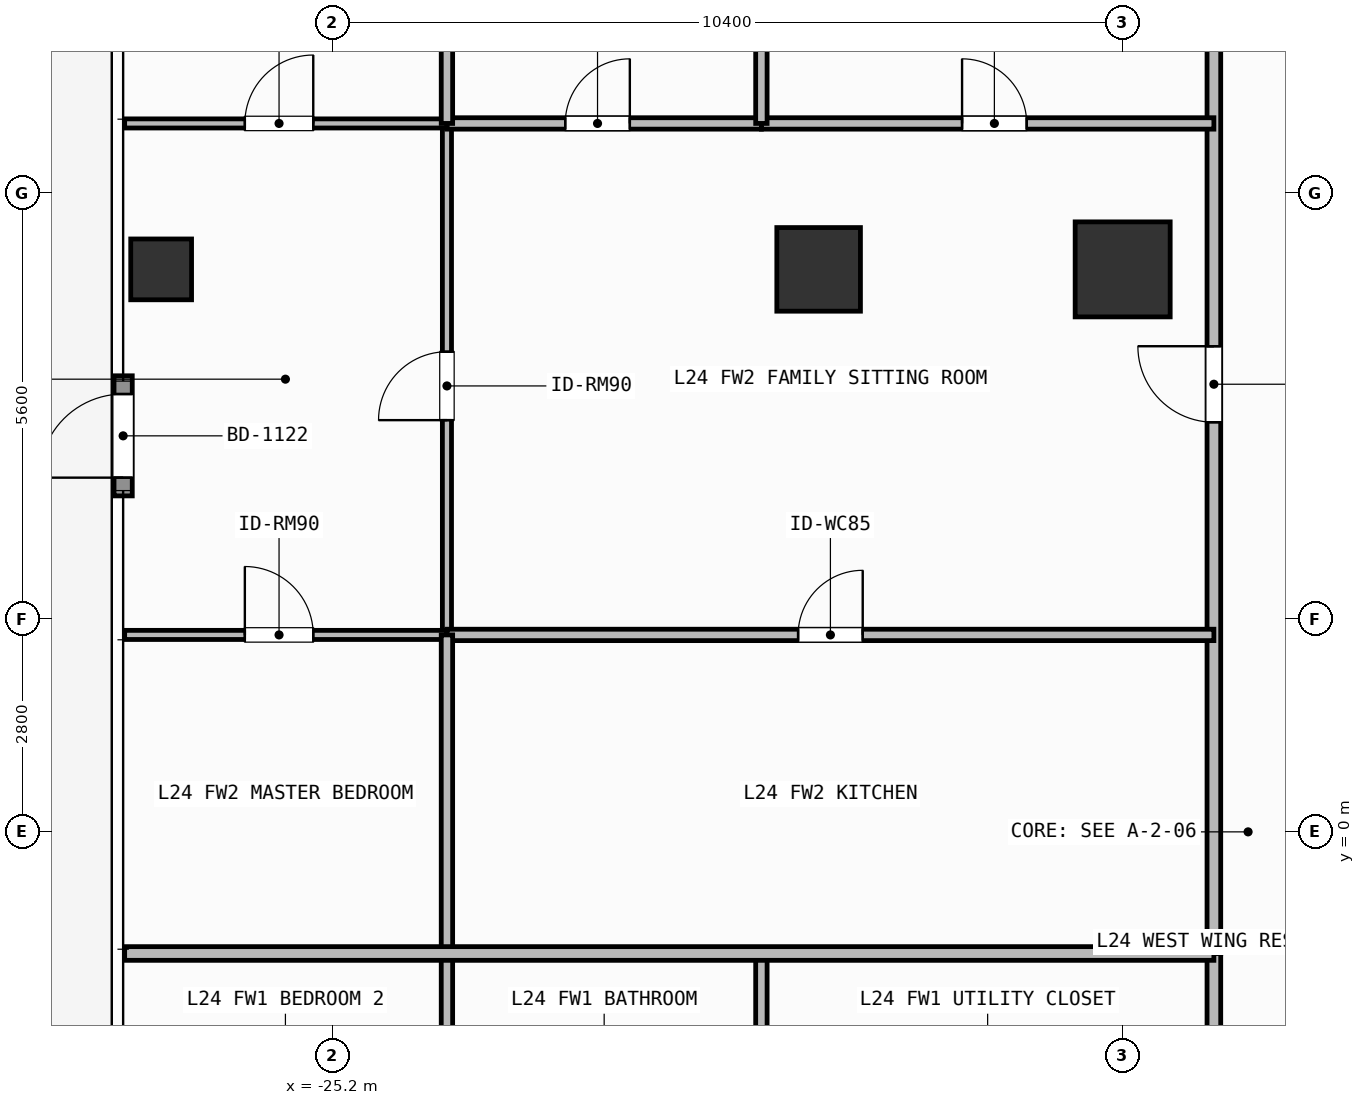
"""IFC4 building model, lengths in metres.
Left out: names, types, materials, properties, quantities, classifications, styles, units other than length and angle.
Written with IfcOpenShell. Run it as: python <this file> out.ifc"""

import sys

from ifc_helpers import new_model, si_unit, direction, frame, frame_2d, origin, origin_2d, place, context, subcontext, project, spatial, rectangle, hollow_rectangle, extrude, element, fill, save


model = new_model("IFC4")
c1 = context("Model", 3, precision=1e-05, world=origin(), true_north=direction((0.0, 1.0)))
c2 = subcontext(c1, "Body", "Model", "MODEL_VIEW")
j1 = project(units=[si_unit("LENGTHUNIT", "METRE"), si_unit("PLANEANGLEUNIT", "RADIAN")], contexts=[c1])
p1 = place(None, origin())
s1 = spatial("IfcSite", under=j1, at=p1, CompositionType="ELEMENT")
p2 = place(p1, origin())
s2 = spatial("IfcBuilding", under=s1, at=p2, CompositionType="ELEMENT")
p3 = place(p2, frame((0.0, 0.0, 96.9)))
s3 = spatial("IfcBuildingStorey", under=s2, at=p3, CompositionType="ELEMENT", Elevation=96.9)
p4 = place(p3, frame((-14.8, 7.4, 0.0), z_axis=(0.0, 0.0, 1.0), x_axis=(1.0, 0.0, 0.0)))
e1 = element("IfcColumn", 1, at=p4, inside=s3, PredefinedType="COLUMN", context=c2, shape_type="SweptSolid", body=[
    extrude(rectangle(XDim=1.25, YDim=1.25, at=origin_2d()), origin(), (0.0, 0.0, 1.0), 3.9),
])
p5 = place(p3, frame((-18.8, 7.4, 0.0), z_axis=(0.0, 0.0, 1.0), x_axis=(1.0, 0.0, 0.0)))
e2 = element("IfcColumn", 2, at=p5, inside=s3, PredefinedType="COLUMN", context=c2, shape_type="SweptSolid", body=[
    extrude(rectangle(XDim=1.1, YDim=1.1, at=origin_2d()), origin(), (0.0, 0.0, 1.0), 3.9),
])
p6 = place(p3, frame((-27.45, 7.4, 0.0), z_axis=(0.0, 0.0, 1.0), x_axis=(1.0, 0.0, 0.0)))
e3 = element("IfcColumn", 3, at=p6, inside=s3, PredefinedType="COLUMN", context=c2, shape_type="SweptSolid", body=[
    extrude(hollow_rectangle(XDim=0.8, YDim=0.8, WallThickness=0.036, at=origin_2d()), origin(), (0.0, 0.0, 1.0), 3.9),
])
p7 = place(p3, frame((-27.95, 4.42, 0.0), z_axis=(0.0, 0.0, 1.0), x_axis=(0.0, 1.0, 0.0)))
e4 = element("IfcWall", 4, at=p7, inside=s3, PredefinedType="SOLIDWALL", context=c2, shape_type="SweptSolid", body=[
    extrude(rectangle(XDim=1.58, YDim=0.24, at=frame_2d((0.79, 0.0))), origin(), (0.0, 0.0, 1.0), 3.68),
])
p8 = place(p7, frame((0.24, 0.0, 0.0)))
e5 = element("IfcOpeningElement", 5, at=p8, cuts=e4, PredefinedType="OPENING", context=c2, shape_type="SweptSolid", body=[
    extrude(rectangle(XDim=1.1, YDim=2.2, at=frame_2d((0.55, 1.1))), frame((0.0, 0.13, 0.0), z_axis=(0.0, -1.0, 0.0), x_axis=(1.0, 0.0, 0.0)), (0.0, 0.0, 1.0), 0.26),
])
p9 = place(p3, frame((-13.6, -12.12, 0.0), z_axis=(0.0, 0.0, 1.0), x_axis=(0.0, 1.0, 0.0)))
e6 = element("IfcWall", 6, at=p9, inside=s3, PredefinedType="PARTITIONING", context=c2, shape_type="SweptSolid", body=[
    extrude(rectangle(XDim=10.52, YDim=0.18, at=frame_2d((5.26, 0.0))), origin(), (0.0, 0.0, 1.0), 3.68),
])
p10 = place(p9, frame((5.468, 0.0, 0.0)))
e7 = element("IfcOpeningElement", 7, at=p10, cuts=e6, PredefinedType="OPENING", context=c2, shape_type="SweptSolid", body=[
    extrude(rectangle(XDim=1.0, YDim=2.2, at=frame_2d((0.5, 1.1))), frame((0.0, 0.1, 0.0), z_axis=(0.0, -1.0, 0.0), x_axis=(1.0, 0.0, 0.0)), (0.0, 0.0, 1.0), 0.2),
])
p11 = place(p3, frame((-13.6, -1.6, 0.0), z_axis=(0.0, 0.0, 1.0), x_axis=(0.0, 1.0, 0.0)))
e8 = element("IfcWall", 8, at=p11, inside=s3, PredefinedType="PARTITIONING", context=c2, shape_type="SweptSolid", body=[
    extrude(rectangle(XDim=13.72, YDim=0.18, at=frame_2d((6.86, 0.0))), origin(), (0.0, 0.0, 1.0), 3.68),
])
p12 = place(p11, frame((6.989, 0.0, 0.0)))
e9 = element("IfcOpeningElement", 9, at=p12, cuts=e8, PredefinedType="OPENING", context=c2, shape_type="SweptSolid", body=[
    extrude(rectangle(XDim=1.0, YDim=2.2, at=frame_2d((0.5, 1.1))), frame((0.0, 0.1, 0.0), z_axis=(0.0, -1.0, 0.0), x_axis=(1.0, 0.0, 0.0)), (0.0, 0.0, 1.0), 0.2),
])
p13 = place(p3, frame((-23.69, 2.591, 0.0), z_axis=(0.0, 0.0, 1.0), x_axis=(0.0, 1.0, 0.0)))
e10 = element("IfcWall", 10, at=p13, inside=s3, PredefinedType="PARTITIONING", context=c2, shape_type="SweptSolid", body=[
    extrude(rectangle(XDim=6.729, YDim=0.12, at=frame_2d((3.365, 0.0))), origin(), (0.0, 0.0, 1.0), 3.68),
])
p14 = place(p13, frame((2.826, 0.0, 0.0)))
e11 = element("IfcOpeningElement", 11, at=p14, cuts=e10, PredefinedType="OPENING", context=c2, shape_type="SweptSolid", body=[
    extrude(rectangle(XDim=0.9, YDim=2.1, at=frame_2d((0.45, 1.05))), frame((0.0, 0.07, 0.0), z_axis=(0.0, -1.0, 0.0), x_axis=(1.0, 0.0, 0.0)), (0.0, 0.0, 1.0), 0.14),
])
p15 = place(p3, frame((-23.69, 9.32, 0.0), z_axis=(0.0, 0.0, 1.0), x_axis=(1.0, 0.0, 0.0)))
e12 = element("IfcWall", 12, at=p15, inside=s3, PredefinedType="PARTITIONING", context=c2, shape_type="SweptSolid", body=[
    extrude(rectangle(XDim=4.137, YDim=0.15, at=frame_2d((2.068, 0.0))), origin(), (0.0, 0.0, 1.0), 3.68),
])
p16 = place(p15, frame((1.556, 0.0, 0.0)))
e13 = element("IfcOpeningElement", 13, at=p16, cuts=e12, PredefinedType="OPENING", context=c2, shape_type="SweptSolid", body=[
    extrude(rectangle(XDim=0.85, YDim=2.1, at=frame_2d((0.425, 1.05))), frame((0.0, 0.085, 0.0), z_axis=(0.0, -1.0, 0.0), x_axis=(1.0, 0.0, 0.0)), (0.0, 0.0, 1.0), 0.17),
])
p17 = place(p3, frame((-19.553, 9.32, 0.0), z_axis=(0.0, 0.0, 1.0), x_axis=(1.0, 0.0, 0.0)))
e14 = element("IfcWall", 14, at=p17, inside=s3, PredefinedType="PARTITIONING", context=c2, shape_type="SweptSolid", body=[
    extrude(rectangle(XDim=5.953, YDim=0.15, at=frame_2d((2.977, 0.0))), origin(), (0.0, 0.0, 1.0), 3.68),
])
p18 = place(p17, frame((2.64, 0.0, 0.0)))
e15 = element("IfcOpeningElement", 15, at=p18, cuts=e14, PredefinedType="OPENING", context=c2, shape_type="SweptSolid", body=[
    extrude(rectangle(XDim=0.85, YDim=2.1, at=frame_2d((0.425, 1.05))), frame((0.0, 0.085, 0.0), z_axis=(0.0, -1.0, 0.0), x_axis=(1.0, 0.0, 0.0)), (0.0, 0.0, 1.0), 0.17),
])
p19 = place(p3, frame((-23.69, 2.591, 0.0), z_axis=(0.0, 0.0, 1.0), x_axis=(1.0, 0.0, 0.0)))
e16 = element("IfcWall", 16, at=p19, inside=s3, PredefinedType="PARTITIONING", context=c2, shape_type="SweptSolid", body=[
    extrude(rectangle(XDim=10.09, YDim=0.15, at=frame_2d((5.045, 0.0))), origin(), (0.0, 0.0, 1.0), 3.68),
])
p20 = place(p19, frame((4.62, 0.0, 0.0)))
e17 = element("IfcOpeningElement", 17, at=p20, cuts=e16, PredefinedType="OPENING", context=c2, shape_type="SweptSolid", body=[
    extrude(rectangle(XDim=0.85, YDim=2.1, at=frame_2d((0.425, 1.05))), frame((0.0, 0.085, 0.0), z_axis=(0.0, -1.0, 0.0), x_axis=(1.0, 0.0, 0.0)), (0.0, 0.0, 1.0), 0.17),
])
p21 = place(p3, frame((-27.93, 2.591, 0.0), z_axis=(0.0, 0.0, 1.0), x_axis=(1.0, 0.0, 0.0)))
e18 = element("IfcWall", 18, at=p21, inside=s3, PredefinedType="PARTITIONING", context=c2, shape_type="SweptSolid", body=[
    extrude(rectangle(XDim=4.24, YDim=0.12, at=frame_2d((2.12, 0.0))), origin(), (0.0, 0.0, 1.0), 3.68),
])
p22 = place(p21, frame((1.581, 0.0, 0.0)))
e19 = element("IfcOpeningElement", 19, at=p22, cuts=e18, PredefinedType="OPENING", context=c2, shape_type="SweptSolid", body=[
    extrude(rectangle(XDim=0.9, YDim=2.1, at=frame_2d((0.45, 1.05))), frame((0.0, 0.07, 0.0), z_axis=(0.0, -1.0, 0.0), x_axis=(1.0, 0.0, 0.0)), (0.0, 0.0, 1.0), 0.14),
])
p23 = place(p3, frame((-27.93, 9.32, 0.0), z_axis=(0.0, 0.0, 1.0), x_axis=(1.0, 0.0, 0.0)))
e20 = element("IfcWall", 20, at=p23, inside=s3, PredefinedType="PARTITIONING", context=c2, shape_type="SweptSolid", body=[
    extrude(rectangle(XDim=4.24, YDim=0.12, at=frame_2d((2.12, 0.0))), origin(), (0.0, 0.0, 1.0), 3.68),
])
p24 = place(p23, frame((1.581, 0.0, 0.0)))
e21 = element("IfcOpeningElement", 21, at=p24, cuts=e20, PredefinedType="OPENING", context=c2, shape_type="SweptSolid", body=[
    extrude(rectangle(XDim=0.9, YDim=2.1, at=frame_2d((0.45, 1.05))), frame((0.0, 0.07, 0.0), z_axis=(0.0, -1.0, 0.0), x_axis=(1.0, 0.0, 0.0)), (0.0, 0.0, 1.0), 0.14),
])
for number, where, z_axis, x_axis in (
    (22, (-19.553, -5.224, 0.0), (0.0, 0.0, 1.0), (0.0, 1.0, 0.0)),
    (23, (-23.69, -5.224, 0.0), (0.0, 0.0, 1.0), (0.0, 1.0, 0.0)),
):
    element("IfcWall", number, at=place(p3, frame(where, z_axis=z_axis, x_axis=x_axis)), inside=s3, PredefinedType="PARTITIONING", context=c2, shape_type="SweptSolid", body=[
        extrude(rectangle(XDim=3.624, YDim=0.15, at=frame_2d((1.812, 0.0))), origin(), (0.0, 0.0, 1.0), 3.68),
    ])
p25 = place(p3, frame((-19.553, 9.32, 0.0), z_axis=(0.0, 0.0, 1.0), x_axis=(0.0, 1.0, 0.0)))
e24 = element("IfcWall", 24, at=p25, inside=s3, PredefinedType="PARTITIONING", context=c2, shape_type="SweptSolid", body=[
    extrude(rectangle(XDim=2.8, YDim=0.15, at=frame_2d((1.4, 0.0))), origin(), (0.0, 0.0, 1.0), 3.68),
])
p26 = place(p3, frame((-23.69, -1.6, 0.0), z_axis=(0.0, 0.0, 1.0), x_axis=(0.0, 1.0, 0.0)))
e25 = element("IfcWall", 25, at=p26, inside=s3, PredefinedType="PARTITIONING", context=c2, shape_type="SweptSolid", body=[
    extrude(rectangle(XDim=4.191, YDim=0.15, at=frame_2d((2.096, 0.0))), origin(), (0.0, 0.0, 1.0), 3.68),
])
p27 = place(p3, frame((-23.69, 9.32, 0.0), z_axis=(0.0, 0.0, 1.0), x_axis=(0.0, 1.0, 0.0)))
e26 = element("IfcWall", 26, at=p27, inside=s3, PredefinedType="PARTITIONING", context=c2, shape_type="SweptSolid", body=[
    extrude(rectangle(XDim=2.8, YDim=0.15, at=frame_2d((1.4, 0.0))), origin(), (0.0, 0.0, 1.0), 3.68),
])
p28 = place(p3, frame((-27.93, -1.6, 0.0), z_axis=(0.0, 0.0, 1.0), x_axis=(1.0, 0.0, 0.0)))
e27 = element("IfcWall", 27, at=p28, inside=s3, PredefinedType="PARTITIONING", context=c2, shape_type="SweptSolid", body=[
    extrude(rectangle(XDim=14.33, YDim=0.18, at=frame_2d((7.165, 0.0))), origin(), (0.0, 0.0, 1.0), 3.68),
])
p29 = place(p8, origin())
e28 = element("IfcDoor", 28, at=p29, inside=s3, OperationType="SINGLE_SWING_LEFT", PredefinedType="DOOR", context=c2, shape_type="SweptSolid", body=[
    extrude(rectangle(XDim=1.1, YDim=2.2, at=frame_2d((0.55, 1.1))), frame((0.0, 0.025, 0.0), z_axis=(0.0, -1.0, 0.0), x_axis=(1.0, 0.0, 0.0)), (0.0, 0.0, 1.0), 0.05),
])
fill(e5, e28)
p30 = place(p12, origin())
e29 = element("IfcDoor", 29, at=p30, inside=s3, OperationType="SINGLE_SWING_RIGHT", PredefinedType="DOOR", context=c2, shape_type="SweptSolid", body=[
    extrude(rectangle(XDim=1.0, YDim=2.2, at=frame_2d((0.5, 1.1))), frame((0.0, 0.025, 0.0), z_axis=(0.0, -1.0, 0.0), x_axis=(1.0, 0.0, 0.0)), (0.0, 0.0, 1.0), 0.05),
])
fill(e9, e29)
p31 = place(p14, origin())
e30 = element("IfcDoor", 30, at=p31, inside=s3, OperationType="SINGLE_SWING_LEFT", PredefinedType="DOOR", context=c2, shape_type="SweptSolid", body=[
    extrude(rectangle(XDim=0.9, YDim=2.1, at=frame_2d((0.45, 1.05))), frame((0.0, 0.025, 0.0), z_axis=(0.0, -1.0, 0.0), x_axis=(1.0, 0.0, 0.0)), (0.0, 0.0, 1.0), 0.05),
])
fill(e11, e30)
p32 = place(p16, origin())
e31 = element("IfcDoor", 31, at=p32, inside=s3, OperationType="SINGLE_SWING_RIGHT", PredefinedType="DOOR", context=c2, shape_type="SweptSolid", body=[
    extrude(rectangle(XDim=0.85, YDim=2.1, at=frame_2d((0.425, 1.05))), frame((0.0, 0.025, 0.0), z_axis=(0.0, -1.0, 0.0), x_axis=(1.0, 0.0, 0.0)), (0.0, 0.0, 1.0), 0.05),
])
fill(e13, e31)
p33 = place(p18, origin())
e32 = element("IfcDoor", 32, at=p33, inside=s3, OperationType="SINGLE_SWING_LEFT", PredefinedType="DOOR", context=c2, shape_type="SweptSolid", body=[
    extrude(rectangle(XDim=0.85, YDim=2.1, at=frame_2d((0.425, 1.05))), frame((0.0, 0.025, 0.0), z_axis=(0.0, -1.0, 0.0), x_axis=(1.0, 0.0, 0.0)), (0.0, 0.0, 1.0), 0.05),
])
fill(e15, e32)
p34 = place(p20, origin())
e33 = element("IfcDoor", 33, at=p34, inside=s3, OperationType="SINGLE_SWING_RIGHT", PredefinedType="DOOR", context=c2, shape_type="SweptSolid", body=[
    extrude(rectangle(XDim=0.85, YDim=2.1, at=frame_2d((0.425, 1.05))), frame((0.0, 0.025, 0.0), z_axis=(0.0, -1.0, 0.0), x_axis=(1.0, 0.0, 0.0)), (0.0, 0.0, 1.0), 0.05),
])
fill(e17, e33)
p35 = place(p22, origin())
e34 = element("IfcDoor", 34, at=p35, inside=s3, OperationType="SINGLE_SWING_LEFT", PredefinedType="DOOR", context=c2, shape_type="SweptSolid", body=[
    extrude(rectangle(XDim=0.9, YDim=2.1, at=frame_2d((0.45, 1.05))), frame((0.0, 0.025, 0.0), z_axis=(0.0, -1.0, 0.0), x_axis=(1.0, 0.0, 0.0)), (0.0, 0.0, 1.0), 0.05),
])
fill(e19, e34)
p36 = place(p24, origin())
e35 = element("IfcDoor", 35, at=p36, inside=s3, OperationType="SINGLE_SWING_RIGHT", PredefinedType="DOOR", context=c2, shape_type="SweptSolid", body=[
    extrude(rectangle(XDim=0.9, YDim=2.1, at=frame_2d((0.45, 1.05))), frame((0.0, 0.025, 0.0), z_axis=(0.0, -1.0, 0.0), x_axis=(1.0, 0.0, 0.0)), (0.0, 0.0, 1.0), 0.05),
])
fill(e21, e35)
save(model, sys.argv[1])
